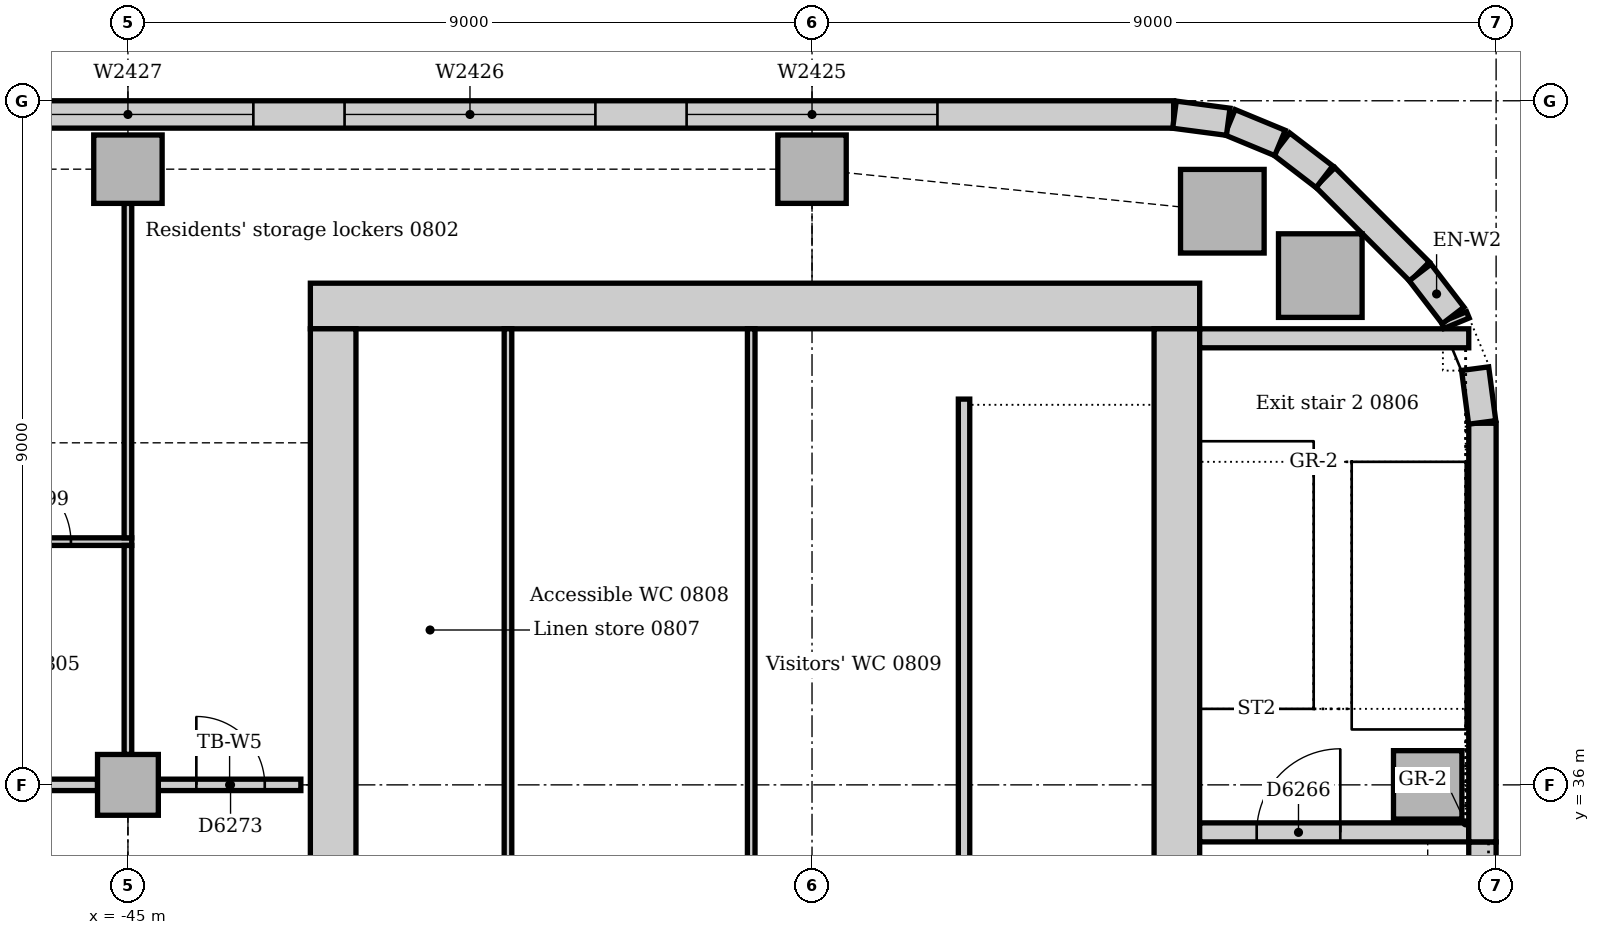
"""IFC4 building model, lengths in metres.
Left out: names, types, materials, properties, quantities, classifications, styles, units other than length and angle.
Written with IfcOpenShell. Run it as: python <this file> out.ifc"""

import sys

from ifc_helpers import new_model, si_unit, direction, frame, frame_2d, origin, origin_2d, place, context, subcontext, project, spatial, rectangle, extrude, element, fill, save


model = new_model("IFC4")
c1 = context("Model", 3, precision=1e-05, world=origin(), true_north=direction((0.0, 1.0)))
c2 = subcontext(c1, "Body", "Model", "MODEL_VIEW")
j1 = project(units=[si_unit("LENGTHUNIT", "METRE"), si_unit("PLANEANGLEUNIT", "RADIAN")], contexts=[c1])
p1 = place(None, origin())
s1 = spatial("IfcSite", under=j1, at=p1, CompositionType="ELEMENT")
p2 = place(p1, origin())
s2 = spatial("IfcBuilding", under=s1, at=p2, CompositionType="ELEMENT")
p3 = place(p2, frame((0.0, 0.0, 38.0)))
s3 = spatial("IfcBuildingStorey", under=s2, at=p3, CompositionType="ELEMENT", Elevation=38.0)
p4 = place(p3, frame((-30.9, 42.3, 0.0), z_axis=(0.0, 0.0, 1.0), x_axis=(-1.0, 0.0, 0.0)))
e1 = element("IfcWall", 1, at=p4, inside=s3, PredefinedType="SOLIDWALL", context=c2, shape_type="SweptSolid", body=[
    extrude(rectangle(XDim=11.7, YDim=0.6, at=frame_2d((5.85, 0.0))), origin(), (0.0, 0.0, 1.0), 4.0),
])
p5 = place(p3, frame((-31.2, 30.5, 0.0), z_axis=(0.0, 0.0, 1.0), x_axis=(0.0, 1.0, 0.0)))
e2 = element("IfcWall", 2, at=p5, inside=s3, PredefinedType="SOLIDWALL", context=c2, shape_type="SweptSolid", body=[
    extrude(rectangle(XDim=11.5, YDim=0.6, at=frame_2d((5.75, 0.0))), origin(), (0.0, 0.0, 1.0), 4.0),
])
p6 = place(p5, frame((0.85, 0.0, 0.0)))
e3 = element("IfcOpeningElement", 3, at=p6, cuts=e2, PredefinedType="OPENING", context=c2, shape_type="SweptSolid", body=[
    extrude(rectangle(XDim=1.8, YDim=2.1, at=frame_2d((0.9, 1.05))), frame((0.0, 0.31, 0.0), z_axis=(0.0, -1.0, 0.0), x_axis=(1.0, 0.0, 0.0)), (0.0, 0.0, 1.0), 0.62),
])
p7 = place(p3, frame((-42.3, 42.0, 0.0), z_axis=(0.0, 0.0, 1.0), x_axis=(0.0, -1.0, 0.0)))
e4 = element("IfcWall", 4, at=p7, inside=s3, PredefinedType="SOLIDWALL", context=c2, shape_type="SweptSolid", body=[
    extrude(rectangle(XDim=11.5, YDim=0.6, at=frame_2d((5.75, 0.0))), origin(), (0.0, 0.0, 1.0), 4.0),
])
p8 = place(p7, frame((8.85, 0.0, 0.0)))
e5 = element("IfcOpeningElement", 5, at=p8, cuts=e4, PredefinedType="OPENING", context=c2, shape_type="SweptSolid", body=[
    extrude(rectangle(XDim=1.8, YDim=2.1, at=frame_2d((0.9, 1.05))), frame((0.0, 0.31, 0.0), z_axis=(0.0, -1.0, 0.0), x_axis=(1.0, 0.0, 0.0)), (0.0, 0.0, 1.0), 0.62),
])
p9 = place(p3, frame((-30.9, 35.375, 0.0), z_axis=(0.0, 0.0, 1.0), x_axis=(1.0, 0.0, 0.0)))
e6 = element("IfcWall", 6, at=p9, inside=s3, PredefinedType="SOLIDWALL", context=c2, shape_type="SweptSolid", body=[
    extrude(rectangle(XDim=3.54, YDim=0.25, at=frame_2d((1.77, 0.0))), origin(), (0.0, 0.0, 1.0), 4.0),
])
p10 = place(p9, frame((0.75, 0.0, 0.0)))
e7 = element("IfcOpeningElement", 7, at=p10, cuts=e6, PredefinedType="OPENING", context=c2, shape_type="SweptSolid", body=[
    extrude(rectangle(XDim=1.1, YDim=2.1, at=frame_2d((0.55, 1.05))), frame((0.0, 0.135, 0.0), z_axis=(0.0, -1.0, 0.0), x_axis=(1.0, 0.0, 0.0)), (0.0, 0.0, 1.0), 0.27),
])
p11 = place(p3, frame((-27.36, 41.875, 0.0), z_axis=(0.0, 0.0, 1.0), x_axis=(-1.0, 0.0, 0.0)))
e8 = element("IfcWall", 8, at=p11, inside=s3, PredefinedType="SOLIDWALL", context=c2, shape_type="SweptSolid", body=[
    extrude(rectangle(XDim=3.54, YDim=0.25, at=frame_2d((1.77, 0.0))), origin(), (0.0, 0.0, 1.0), 4.0),
])
for number, where, z_axis, x_axis in (
    (9, (-29.313, 42.7, 0.0), (0.0, 0.0, 1.0), (1.0, 0.0, 0.0)),
    (10, (-30.602, 43.547, 0.0), (0.0, 0.0, 1.0), (1.0, 0.0, 0.0)),
):
    element("IfcColumn", number, at=place(p3, frame(where, z_axis=z_axis, x_axis=x_axis)), inside=s3, PredefinedType="COLUMN", context=c2, shape_type="SweptSolid", body=[
        extrude(rectangle(XDim=1.1, YDim=1.1, at=origin_2d()), origin(), (0.0, 0.0, 1.0), 3.85),
    ])
p12 = place(p3, frame((-27.9, 36.0, 0.0), z_axis=(0.0, 0.0, 1.0), x_axis=(1.0, 0.0, 0.0)))
e11 = element("IfcColumn", 11, at=p12, inside=s3, PredefinedType="COLUMN", context=c2, shape_type="SweptSolid", body=[
    extrude(rectangle(XDim=0.9, YDim=0.9, at=origin_2d()), origin(), (0.0, 0.0, 1.0), 4.0),
])
for number, where, z_axis, x_axis in (
    (12, (-45.0, 44.1, 0.0), (0.0, 0.0, 1.0), (1.0, 0.0, 0.0)),
    (13, (-36.0, 44.1, 0.0), (0.0, 0.0, 1.0), (1.0, 0.0, 0.0)),
):
    element("IfcColumn", number, at=place(p3, frame(where, z_axis=z_axis, x_axis=x_axis)), inside=s3, PredefinedType="COLUMN", context=c2, shape_type="SweptSolid", body=[
        extrude(rectangle(XDim=0.9, YDim=0.9, at=origin_2d()), origin(), (0.0, 0.0, 1.0), 3.85),
    ])
p13 = place(p3, frame((-45.0, 36.0, 0.0), z_axis=(0.0, 0.0, 1.0), x_axis=(1.0, 0.0, 0.0)))
e14 = element("IfcColumn", 14, at=p13, inside=s3, PredefinedType="COLUMN", context=c2, shape_type="SweptSolid", body=[
    extrude(rectangle(XDim=0.8, YDim=0.8, at=origin_2d()), origin(), (0.0, 0.0, 1.0), 3.85),
])
p14 = place(p3, frame((-27.18, 27.75, 0.0), z_axis=(0.0, 0.0, 1.0), x_axis=(0.0, 1.0, 0.0)))
e15 = element("IfcWall", 15, at=p14, inside=s3, PredefinedType="STANDARD", context=c2, shape_type="SweptSolid", body=[
    extrude(rectangle(XDim=7.5, YDim=0.36, at=frame_2d((3.75, 0.0))), origin(), (0.0, 0.0, 1.0), 3.85),
])
p15 = place(p14, frame((2.85, 0.0, 1.2)))
e16 = element("IfcOpeningElement", 16, at=p15, cuts=e15, PredefinedType="OPENING", context=c2, shape_type="SweptSolid", body=[
    extrude(rectangle(XDim=1.8, YDim=1.2, at=frame_2d((0.9, 0.6))), frame((0.0, 0.19, 0.0), z_axis=(0.0, -1.0, 0.0), x_axis=(1.0, 0.0, 0.0)), (0.0, 0.0, 1.0), 0.38),
])
p16 = place(p3, frame((-27.18, 35.25, 0.0), z_axis=(0.0, 0.0, 1.0), x_axis=(0.0, 1.0, 0.0)))
e17 = element("IfcWall", 17, at=p16, inside=s3, PredefinedType="STANDARD", context=c2, shape_type="SweptSolid", body=[
    extrude(rectangle(XDim=5.507, YDim=0.36, at=frame_2d((2.754, 0.0))), origin(), (0.0, 0.0, 1.0), 3.85),
])
p17 = place(p3, frame((-28.006, 42.751, 0.0), z_axis=(0.0, 0.0, 1.0), x_axis=(-0.707106781187, 0.707106781187, 0.0)))
e18 = element("IfcWall", 18, at=p17, inside=s3, PredefinedType="STANDARD", context=c2, shape_type="SweptSolid", body=[
    extrude(rectangle(XDim=1.757, YDim=0.36, at=frame_2d((0.879, 0.0))), origin(), (0.0, 0.0, 1.0), 3.85),
])
p18 = place(p3, frame((-31.243, 44.82, 0.0), z_axis=(0.0, 0.0, 1.0), x_axis=(-1.0, 0.0, 0.0)))
e19 = element("IfcWall", 19, at=p18, inside=s3, PredefinedType="STANDARD", context=c2, shape_type="SweptSolid", body=[
    extrude(rectangle(XDim=36.515, YDim=0.36, at=frame_2d((18.257, 0.0))), origin(), (0.0, 0.0, 1.0), 3.85),
])
p19 = place(p18, frame((3.107, 0.0, 0.9)))
e20 = element("IfcOpeningElement", 20, at=p19, cuts=e19, PredefinedType="OPENING", context=c2, shape_type="SweptSolid", body=[
    extrude(rectangle(XDim=3.3, YDim=1.6, at=frame_2d((1.65, 0.8))), frame((0.0, 0.19, 0.0), z_axis=(0.0, -1.0, 0.0), x_axis=(1.0, 0.0, 0.0)), (0.0, 0.0, 1.0), 0.38),
])
p20 = place(p18, frame((7.607, 0.0, 0.9)))
e21 = element("IfcOpeningElement", 21, at=p20, cuts=e19, PredefinedType="OPENING", context=c2, shape_type="SweptSolid", body=[
    extrude(rectangle(XDim=3.3, YDim=1.6, at=frame_2d((1.65, 0.8))), frame((0.0, 0.19, 0.0), z_axis=(0.0, -1.0, 0.0), x_axis=(1.0, 0.0, 0.0)), (0.0, 0.0, 1.0), 0.38),
])
p21 = place(p18, frame((12.107, 0.0, 0.9)))
e22 = element("IfcOpeningElement", 22, at=p21, cuts=e19, PredefinedType="OPENING", context=c2, shape_type="SweptSolid", body=[
    extrude(rectangle(XDim=3.3, YDim=1.6, at=frame_2d((1.65, 0.8))), frame((0.0, 0.19, 0.0), z_axis=(0.0, -1.0, 0.0), x_axis=(1.0, 0.0, 0.0)), (0.0, 0.0, 1.0), 0.38),
])
p22 = place(p18, frame((16.607, 0.0, 0.9)))
e23 = element("IfcOpeningElement", 23, at=p22, cuts=e19, PredefinedType="OPENING", context=c2, shape_type="SweptSolid", body=[
    extrude(rectangle(XDim=3.3, YDim=1.6, at=frame_2d((1.65, 0.8))), frame((0.0, 0.19, 0.0), z_axis=(0.0, -1.0, 0.0), x_axis=(1.0, 0.0, 0.0)), (0.0, 0.0, 1.0), 0.38),
])
p23 = place(p18, frame((21.107, 0.0, 0.9)))
e24 = element("IfcOpeningElement", 24, at=p23, cuts=e19, PredefinedType="OPENING", context=c2, shape_type="SweptSolid", body=[
    extrude(rectangle(XDim=3.3, YDim=1.6, at=frame_2d((1.65, 0.8))), frame((0.0, 0.19, 0.0), z_axis=(0.0, -1.0, 0.0), x_axis=(1.0, 0.0, 0.0)), (0.0, 0.0, 1.0), 0.38),
])
p24 = place(p18, frame((25.607, 0.0, 0.9)))
e25 = element("IfcOpeningElement", 25, at=p24, cuts=e19, PredefinedType="OPENING", context=c2, shape_type="SweptSolid", body=[
    extrude(rectangle(XDim=3.3, YDim=1.6, at=frame_2d((1.65, 0.8))), frame((0.0, 0.19, 0.0), z_axis=(0.0, -1.0, 0.0), x_axis=(1.0, 0.0, 0.0)), (0.0, 0.0, 1.0), 0.38),
])
p25 = place(p18, frame((30.107, 0.0, 0.9)))
e26 = element("IfcOpeningElement", 26, at=p25, cuts=e19, PredefinedType="OPENING", context=c2, shape_type="SweptSolid", body=[
    extrude(rectangle(XDim=3.3, YDim=1.6, at=frame_2d((1.65, 0.8))), frame((0.0, 0.19, 0.0), z_axis=(0.0, -1.0, 0.0), x_axis=(1.0, 0.0, 0.0)), (0.0, 0.0, 1.0), 0.38),
])
p26 = place(p3, frame((-27.183, 40.769, 0.0), z_axis=(0.0, 0.0, 1.0), x_axis=(-0.13055608231, 0.99144092581, 0.0)))
e27 = element("IfcWall", 27, at=p26, inside=s3, PredefinedType="STANDARD", context=c2, shape_type="SweptSolid", body=[
    extrude(rectangle(XDim=0.713, YDim=0.36, at=frame_2d((0.356, 0.0))), origin(), (0.0, 0.0, 1.0), 3.85),
])
p27 = place(p3, frame((-27.521, 42.074, 0.0), z_axis=(0.0, 0.0, 1.0), x_axis=(-0.382549378284, 0.923935048136, 0.0)))
e28 = element("IfcWall", 28, at=p27, inside=s3, PredefinedType="STANDARD", context=c2, shape_type="SweptSolid", body=[
    extrude(rectangle(XDim=0.089, YDim=0.36, at=frame_2d((0.045, 0.0))), origin(), (0.0, 0.0, 1.0), 3.85),
])
for number, where, z_axis, x_axis in (
    (29, (-27.566, 42.175, 0.0), (0.0, 0.0, 1.0), (-0.609, 0.793, 0.0)),
    (30, (-29.259, 44.0, 0.0), (0.0, 0.0, 1.0), (-0.793, 0.609, 0.0)),
):
    element("IfcWall", number, at=place(p3, frame(where, z_axis=z_axis, x_axis=x_axis)), inside=s3, PredefinedType="STANDARD", context=c2, shape_type="SweptSolid", body=[
        extrude(rectangle(XDim=0.713, YDim=0.36, at=frame_2d((0.357, 0.0))), origin(), (0.0, 0.0, 1.0), 3.85),
    ])
for number, where, z_axis, x_axis in (
    (31, (-29.844, 44.445, 0.0), (0.0, 0.0, 1.0), (-0.924, 0.383, 0.0)),
    (32, (-30.524, 44.724, 0.0), (0.0, 0.0, 1.0), (-0.991, 0.131, 0.0)),
):
    element("IfcWall", number, at=place(p3, frame(where, z_axis=z_axis, x_axis=x_axis)), inside=s3, PredefinedType="STANDARD", context=c2, shape_type="SweptSolid", body=[
        extrude(rectangle(XDim=0.713, YDim=0.36, at=frame_2d((0.356, 0.0))), origin(), (0.0, 0.0, 1.0), 3.85),
    ])
p28 = place(p3, frame((-34.0, 41.075, 0.0), z_axis=(0.0, 0.0, 1.0), x_axis=(0.0, -1.0, 0.0)))
e33 = element("IfcWall", 33, at=p28, inside=s3, PredefinedType="SOLIDWALL", context=c2, shape_type="SweptSolid", body=[
    extrude(rectangle(XDim=7.0, YDim=0.15, at=frame_2d((3.5, 0.0))), origin(), (0.0, 0.0, 1.0), 4.0),
])
for number, where, z_axis, x_axis in (
    (34, (-40.0, 34.075, 0.0), (0.0, 0.0, 1.0), (0.0, 1.0, 0.0)),
    (35, (-36.8, 34.075, 0.0), (0.0, 0.0, 1.0), (0.0, 1.0, 0.0)),
):
    element("IfcWall", number, at=place(p3, frame(where, z_axis=z_axis, x_axis=x_axis)), inside=s3, PredefinedType="PARTITIONING", context=c2, shape_type="SweptSolid", body=[
        extrude(rectangle(XDim=7.925, YDim=0.1, at=frame_2d((3.962, 0.0))), origin(), (0.0, 0.0, 1.0), 3.85),
    ])
p29 = place(p3, frame((-44.6, 36.0, 0.0), z_axis=(0.0, 0.0, 1.0), x_axis=(1.0, 0.0, 0.0)))
e36 = element("IfcWall", 36, at=p29, inside=s3, PredefinedType="PARTITIONING", context=c2, shape_type="SweptSolid", body=[
    extrude(rectangle(XDim=1.875, YDim=0.15, at=frame_2d((0.938, 0.0))), origin(), (0.0, 0.0, 1.0), 3.602),
])
p30 = place(p29, frame((0.5, 0.0, 0.0)))
e37 = element("IfcOpeningElement", 37, at=p30, cuts=e36, PredefinedType="OPENING", context=c2, shape_type="SweptSolid", body=[
    extrude(rectangle(XDim=0.9, YDim=2.1, at=frame_2d((0.45, 1.05))), frame((0.0, 0.085, 0.0), z_axis=(0.0, -1.0, 0.0), x_axis=(1.0, 0.0, 0.0)), (0.0, 0.0, 1.0), 0.17),
])
p31 = place(p3, frame((-53.6, 36.0, 0.0), z_axis=(0.0, 0.0, 1.0), x_axis=(1.0, 0.0, 0.0)))
e38 = element("IfcWall", 38, at=p31, inside=s3, PredefinedType="PARTITIONING", context=c2, shape_type="SweptSolid", body=[
    extrude(rectangle(XDim=8.2, YDim=0.15, at=frame_2d((4.1, 0.0))), origin(), (0.0, 0.0, 1.0), 3.15),
])
p32 = place(p3, frame((-62.925, 39.2, 0.0), z_axis=(0.0, 0.0, 1.0), x_axis=(1.0, 0.0, 0.0)))
e39 = element("IfcWall", 39, at=p32, inside=s3, PredefinedType="PARTITIONING", context=c2, shape_type="SweptSolid", body=[
    extrude(rectangle(XDim=17.975, YDim=0.1, at=frame_2d((8.988, 0.0))), origin(), (0.0, 0.0, 1.0), 3.85),
])
p33 = place(p32, frame((11.635, 0.0, 0.0)))
e40 = element("IfcOpeningElement", 40, at=p33, cuts=e39, PredefinedType="OPENING", context=c2, shape_type="SweptSolid", body=[
    extrude(rectangle(XDim=0.9, YDim=2.1, at=frame_2d((0.45, 1.05))), frame((0.0, 0.06, 0.0), z_axis=(0.0, -1.0, 0.0), x_axis=(1.0, 0.0, 0.0)), (0.0, 0.0, 1.0), 0.12),
])
p34 = place(p32, frame((4.865, 0.0, 0.0)))
e41 = element("IfcOpeningElement", 41, at=p34, cuts=e39, PredefinedType="OPENING", context=c2, shape_type="SweptSolid", body=[
    extrude(rectangle(XDim=0.9, YDim=2.1, at=frame_2d((0.45, 1.05))), frame((0.0, 0.06, 0.0), z_axis=(0.0, -1.0, 0.0), x_axis=(1.0, 0.0, 0.0)), (0.0, 0.0, 1.0), 0.12),
])
p35 = place(p32, frame((16.275, 0.0, 0.0)))
e42 = element("IfcOpeningElement", 42, at=p35, cuts=e39, PredefinedType="OPENING", context=c2, shape_type="SweptSolid", body=[
    extrude(rectangle(XDim=0.9, YDim=2.1, at=frame_2d((0.45, 1.05))), frame((0.0, 0.06, 0.0), z_axis=(0.0, -1.0, 0.0), x_axis=(1.0, 0.0, 0.0)), (0.0, 0.0, 1.0), 0.12),
])
p36 = place(p3, frame((-45.0, 39.25, 0.0), z_axis=(0.0, 0.0, 1.0), x_axis=(0.0, 1.0, 0.0)))
e43 = element("IfcWall", 43, at=p36, inside=s3, PredefinedType="PARTITIONING", context=c2, shape_type="SweptSolid", body=[
    extrude(rectangle(XDim=4.4, YDim=0.1, at=frame_2d((2.2, 0.0))), origin(), (0.0, 0.0, 1.0), 3.158),
])
p37 = place(p3, frame((-45.0, 36.4, 0.0), z_axis=(0.0, 0.0, 1.0), x_axis=(0.0, 1.0, 0.0)))
e44 = element("IfcWall", 44, at=p37, inside=s3, PredefinedType="PARTITIONING", context=c2, shape_type="SweptSolid", body=[
    extrude(rectangle(XDim=2.75, YDim=0.1, at=frame_2d((1.375, 0.0))), origin(), (0.0, 0.0, 1.0), 3.158),
])
p38 = place(p19, origin())
e45 = element("IfcWindow", 45, at=p38, inside=s3, PartitioningType="SINGLE_PANEL", PredefinedType="WINDOW", context=c2, shape_type="SweptSolid", body=[
    extrude(rectangle(XDim=3.3, YDim=1.6, at=frame_2d((1.65, 0.8))), frame((0.0, 0.13, 0.0), z_axis=(0.0, -1.0, 0.0), x_axis=(1.0, 0.0, 0.0)), (0.0, 0.0, 1.0), 0.06),
])
fill(e20, e45)
p39 = place(p20, origin())
e46 = element("IfcWindow", 46, at=p39, inside=s3, PartitioningType="SINGLE_PANEL", PredefinedType="WINDOW", context=c2, shape_type="SweptSolid", body=[
    extrude(rectangle(XDim=3.3, YDim=1.6, at=frame_2d((1.65, 0.8))), frame((0.0, 0.13, 0.0), z_axis=(0.0, -1.0, 0.0), x_axis=(1.0, 0.0, 0.0)), (0.0, 0.0, 1.0), 0.06),
])
fill(e21, e46)
p40 = place(p21, origin())
e47 = element("IfcWindow", 47, at=p40, inside=s3, PartitioningType="SINGLE_PANEL", PredefinedType="WINDOW", context=c2, shape_type="SweptSolid", body=[
    extrude(rectangle(XDim=3.3, YDim=1.6, at=frame_2d((1.65, 0.8))), frame((0.0, 0.13, 0.0), z_axis=(0.0, -1.0, 0.0), x_axis=(1.0, 0.0, 0.0)), (0.0, 0.0, 1.0), 0.06),
])
fill(e22, e47)
p41 = place(p10, origin())
e48 = element("IfcDoor", 48, at=p41, inside=s3, OperationType="SINGLE_SWING_RIGHT", PredefinedType="DOOR", context=c2, shape_type="SweptSolid", body=[
    extrude(rectangle(XDim=1.1, YDim=2.1, at=frame_2d((0.55, 1.05))), frame((0.0, 0.025, 0.0), z_axis=(0.0, -1.0, 0.0), x_axis=(1.0, 0.0, 0.0)), (0.0, 0.0, 1.0), 0.05),
])
fill(e7, e48)
p42 = place(p30, origin())
e49 = element("IfcDoor", 49, at=p42, inside=s3, OperationType="SINGLE_SWING_LEFT", PredefinedType="DOOR", context=c2, shape_type="SweptSolid", body=[
    extrude(rectangle(XDim=0.9, YDim=2.1, at=frame_2d((0.45, 1.05))), frame((0.0, 0.025, 0.0), z_axis=(0.0, -1.0, 0.0), x_axis=(1.0, 0.0, 0.0)), (0.0, 0.0, 1.0), 0.05),
])
fill(e37, e49)
p43 = place(p35, origin())
e50 = element("IfcDoor", 50, at=p43, inside=s3, OperationType="SINGLE_SWING_LEFT", PredefinedType="DOOR", context=c2, shape_type="SweptSolid", body=[
    extrude(rectangle(XDim=0.9, YDim=2.1, at=frame_2d((0.45, 1.05))), frame((0.0, 0.025, 0.0), z_axis=(0.0, -1.0, 0.0), x_axis=(1.0, 0.0, 0.0)), (0.0, 0.0, 1.0), 0.05),
])
fill(e42, e50)
save(model, sys.argv[1])
